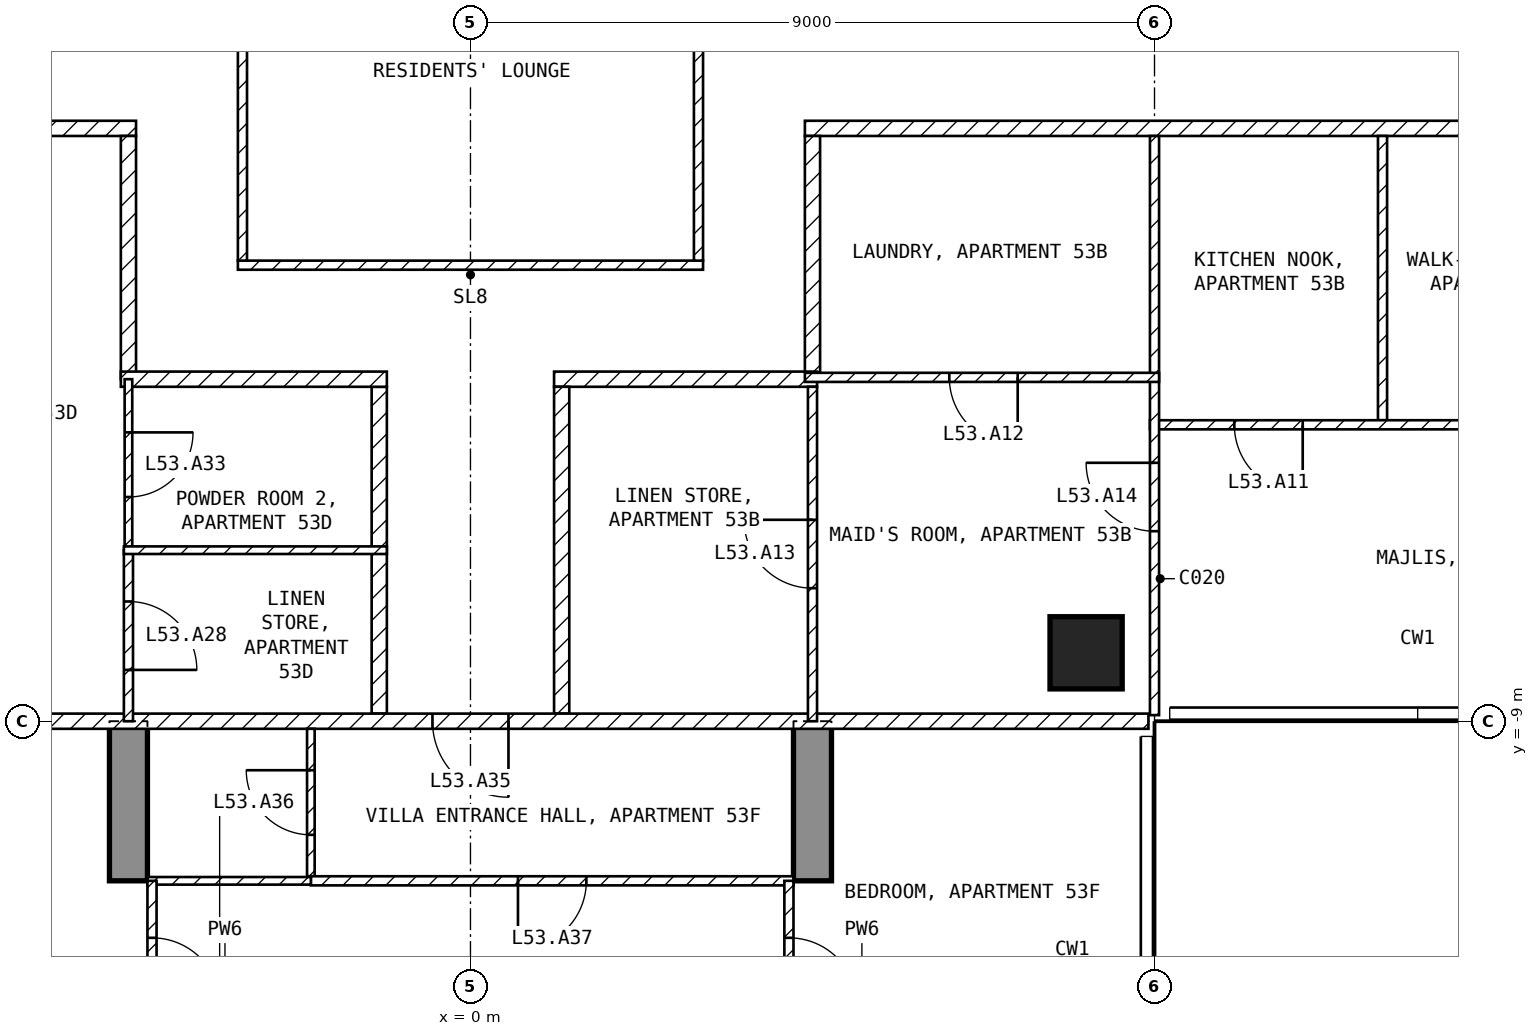
"""IFC4 building model, lengths in metres.
Left out: names, types, materials, properties, quantities, classifications, styles, units other than length and angle.
Written with IfcOpenShell. Run it as: python <this file> out.ifc"""

import sys

from ifc_helpers import new_model, si_unit, direction, frame, frame_2d, origin, origin_2d, place, context, subcontext, project, spatial, polyline, rectangle, outline, extrude, element, fill, save


model = new_model("IFC4")
c1 = context("Model", 3, precision=1e-05, world=origin(), true_north=direction((0.0, 1.0)))
c2 = subcontext(c1, "Body", "Model", "MODEL_VIEW")
j1 = project(units=[si_unit("LENGTHUNIT", "METRE"), si_unit("PLANEANGLEUNIT", "RADIAN")], contexts=[c1])
p1 = place(None, origin())
s1 = spatial("IfcSite", under=j1, at=p1, CompositionType="ELEMENT")
p2 = place(p1, origin())
s2 = spatial("IfcBuilding", under=s1, at=p2, CompositionType="ELEMENT")
p3 = place(p2, frame((0.0, 0.0, 212.1)))
s3 = spatial("IfcBuildingStorey", under=s2, at=p3, CompositionType="ELEMENT", Elevation=212.1)
p4 = place(p3, frame((8.1, -8.1, -0.25), z_axis=(0.0, 0.0, 1.0), x_axis=(1.0, 0.0, 0.0)))
e1 = element("IfcColumn", 1, at=p4, inside=s3, PredefinedType="COLUMN", context=c2, shape_type="SweptSolid", body=[
    extrude(rectangle(XDim=0.95, YDim=0.95, at=origin_2d()), origin(), (0.0, 0.0, 1.0), 3.5),
])
for number, where, z_axis, x_axis in (
    (2, (-4.75, -20.225, -0.25), (1.0, 0.0, 0.0), (0.0, 1.0, 0.0)),
    (3, (4.25, -20.225, -0.25), (1.0, 0.0, 0.0), (0.0, 1.0, 0.0)),
):
    element("IfcWall", number, at=place(p3, frame(where, z_axis=z_axis, x_axis=x_axis)), inside=s3, PredefinedType="SHEAR", context=c2, shape_type="SweptSolid", body=[
        extrude(outline(polyline([(0.0, 0.0), (6.725, 0.0), (6.725, 2.65), (9.125, 2.65), (9.125, 0.0), (11.225, 0.0), (11.225, 3.5), (0.0, 3.5), (0.0, 0.0)])), origin(), (0.0, 0.0, 1.0), 0.5),
    ])
p5 = place(p3, frame((-3.06, -3.0, 0.0), z_axis=(0.0, 0.0, 1.0), x_axis=(1.0, 0.0, 0.0)))
e4 = element("IfcWall", 4, at=p5, inside=s3, PredefinedType="PARTITIONING", context=c2, shape_type="SweptSolid", body=[
    extrude(rectangle(XDim=6.12, YDim=0.12, at=frame_2d((3.06, 0.0))), origin(), (0.0, 0.0, 1.0), 3.25),
])
for number, where, z_axis, x_axis in (
    (5, (3.0, -2.94, 0.0), (0.0, 0.0, 1.0), (0.0, 1.0, 0.0)),
    (6, (-3.0, 2.94, 0.0), (0.0, 0.0, 1.0), (0.0, -1.0, 0.0)),
):
    element("IfcWall", number, at=place(p3, frame(where, z_axis=z_axis, x_axis=x_axis)), inside=s3, PredefinedType="PARTITIONING", context=c2, shape_type="SweptSolid", body=[
        extrude(rectangle(XDim=5.88, YDim=0.12, at=frame_2d((2.94, 0.0))), origin(), (0.0, 0.0, 1.0), 3.25),
    ])
p6 = place(p3, frame((21.6, -1.2, 0.0), z_axis=(0.0, 0.0, 1.0), x_axis=(-1.0, 0.0, 0.0)))
e7 = element("IfcWall", 7, at=p6, inside=s3, PredefinedType="PARTITIONING", context=c2, shape_type="SweptSolid", body=[
    extrude(rectangle(XDim=17.2, YDim=0.2, at=frame_2d((8.6, 0.0))), origin(), (0.0, 0.0, 1.0), 3.25),
])
p7 = place(p6, frame((4.675, 0.0, 0.0)))
e8 = element("IfcOpeningElement", 8, at=p7, cuts=e7, PredefinedType="OPENING", context=c2, shape_type="SweptSolid", body=[
    extrude(rectangle(XDim=1.0, YDim=2.1, at=frame_2d((0.5, 1.05))), frame((0.0, 0.11, 0.0), z_axis=(0.0, -1.0, 0.0), x_axis=(1.0, 0.0, 0.0)), (0.0, 0.0, 1.0), 0.22),
])
p8 = place(p3, frame((4.5, -1.3, 0.0), z_axis=(0.0, 0.0, 1.0), x_axis=(0.0, -1.0, 0.0)))
e9 = element("IfcWall", 9, at=p8, inside=s3, PredefinedType="PARTITIONING", context=c2, shape_type="SweptSolid", body=[
    extrude(rectangle(XDim=3.116, YDim=0.2, at=frame_2d((1.558, 0.0))), origin(), (0.0, 0.0, 1.0), 3.25),
])
p9 = place(p3, frame((4.56, -4.5, 0.0), z_axis=(0.0, 0.0, 1.0), x_axis=(-1.0, 0.0, 0.0)))
e10 = element("IfcWall", 10, at=p9, inside=s3, PredefinedType="PARTITIONING", context=c2, shape_type="SweptSolid", body=[
    extrude(rectangle(XDim=3.46, YDim=0.2, at=frame_2d((1.73, 0.0))), origin(), (0.0, 0.0, 1.0), 3.25),
])
p10 = place(p3, frame((1.2, -4.6, 0.0), z_axis=(0.0, 0.0, 1.0), x_axis=(0.0, -1.0, 0.0)))
e11 = element("IfcWall", 11, at=p10, inside=s3, PredefinedType="PARTITIONING", context=c2, shape_type="SweptSolid", body=[
    extrude(rectangle(XDim=4.3, YDim=0.2, at=frame_2d((2.15, 0.0))), origin(), (0.0, 0.0, 1.0), 3.25),
])
p11 = place(p3, frame((-4.4, -1.2, 0.0), z_axis=(0.0, 0.0, 1.0), x_axis=(-1.0, 0.0, 0.0)))
e12 = element("IfcWall", 12, at=p11, inside=s3, PredefinedType="PARTITIONING", context=c2, shape_type="SweptSolid", body=[
    extrude(rectangle(XDim=17.2, YDim=0.2, at=frame_2d((8.6, 0.0))), origin(), (0.0, 0.0, 1.0), 3.25),
])
p12 = place(p11, frame((7.7, 0.0, 0.0)))
e13 = element("IfcOpeningElement", 13, at=p12, cuts=e12, PredefinedType="OPENING", context=c2, shape_type="SweptSolid", body=[
    extrude(rectangle(XDim=1.0, YDim=2.1, at=frame_2d((0.5, 1.05))), frame((0.0, 0.11, 0.0), z_axis=(0.0, -1.0, 0.0), x_axis=(1.0, 0.0, 0.0)), (0.0, 0.0, 1.0), 0.22),
])
p13 = place(p3, frame((-4.5, -4.5, 0.0), z_axis=(0.0, 0.0, 1.0), x_axis=(0.0, 1.0, 0.0)))
e14 = element("IfcWall", 14, at=p13, inside=s3, PredefinedType="PARTITIONING", context=c2, shape_type="SweptSolid", body=[
    extrude(rectangle(XDim=3.2, YDim=0.2, at=frame_2d((1.6, 0.0))), origin(), (0.0, 0.0, 1.0), 3.25),
])
p14 = place(p3, frame((-1.2, -8.9, 0.0), z_axis=(0.0, 0.0, 1.0), x_axis=(0.0, 1.0, 0.0)))
e15 = element("IfcWall", 15, at=p14, inside=s3, PredefinedType="PARTITIONING", context=c2, shape_type="SweptSolid", body=[
    extrude(rectangle(XDim=4.3, YDim=0.2, at=frame_2d((2.15, 0.0))), origin(), (0.0, 0.0, 1.0), 3.25),
])
p15 = place(p3, frame((-1.1, -4.5, 0.0), z_axis=(0.0, 0.0, 1.0), x_axis=(-1.0, 0.0, 0.0)))
e16 = element("IfcWall", 16, at=p15, inside=s3, PredefinedType="PARTITIONING", context=c2, shape_type="SweptSolid", body=[
    extrude(rectangle(XDim=3.5, YDim=0.2, at=frame_2d((1.75, 0.0))), origin(), (0.0, 0.0, 1.0), 3.25),
])
p16 = place(p3, frame((8.92, -9.0, 0.0), z_axis=(0.0, 0.0, 1.0), x_axis=(-1.0, 0.0, 0.0)))
e17 = element("IfcWall", 17, at=p16, inside=s3, PredefinedType="PARTITIONING", context=c2, shape_type="SweptSolid", body=[
    extrude(rectangle(XDim=17.84, YDim=0.2, at=frame_2d((8.92, 0.0))), origin(), (0.0, 0.0, 1.0), 3.25),
])
p17 = place(p16, frame((8.42, 0.0, 0.0)))
e18 = element("IfcOpeningElement", 18, at=p17, cuts=e17, PredefinedType="OPENING", context=c2, shape_type="SweptSolid", body=[
    extrude(rectangle(XDim=1.0, YDim=2.1, at=frame_2d((0.5, 1.05))), frame((0.0, 0.11, 0.0), z_axis=(0.0, -1.0, 0.0), x_axis=(1.0, 0.0, 0.0)), (0.0, 0.0, 1.0), 0.22),
])
p18 = place(p3, frame((12.0, -1.3, 0.0), z_axis=(0.0, 0.0, 1.0), x_axis=(0.0, -1.0, 0.0)))
e19 = element("IfcWall", 19, at=p18, inside=s3, PredefinedType="PARTITIONING", context=c2, shape_type="SweptSolid", body=[
    extrude(rectangle(XDim=3.74, YDim=0.12, at=frame_2d((1.87, 0.0))), origin(), (0.0, 0.0, 1.0), 3.25),
])
p19 = place(p3, frame((19.5, -5.1, 0.0), z_axis=(0.0, 0.0, 1.0), x_axis=(-1.0, 0.0, 0.0)))
e20 = element("IfcWall", 20, at=p19, inside=s3, PredefinedType="PARTITIONING", context=c2, shape_type="SweptSolid", body=[
    extrude(rectangle(XDim=10.56, YDim=0.12, at=frame_2d((5.28, 0.0))), origin(), (0.0, 0.0, 1.0), 3.25),
])
p20 = place(p19, frame((8.55, 0.0, 0.0)))
e21 = element("IfcOpeningElement", 21, at=p20, cuts=e20, PredefinedType="OPENING", context=c2, shape_type="SweptSolid", body=[
    extrude(rectangle(XDim=0.9, YDim=2.1, at=frame_2d((0.45, 1.05))), frame((0.0, 0.07, 0.0), z_axis=(0.0, -1.0, 0.0), x_axis=(1.0, 0.0, 0.0)), (0.0, 0.0, 1.0), 0.14),
])
p21 = place(p19, frame((2.625, 0.0, 0.0)))
e22 = element("IfcOpeningElement", 22, at=p21, cuts=e20, PredefinedType="OPENING", context=c2, shape_type="SweptSolid", body=[
    extrude(rectangle(XDim=0.9, YDim=2.1, at=frame_2d((0.45, 1.05))), frame((0.0, 0.07, 0.0), z_axis=(0.0, -1.0, 0.0), x_axis=(1.0, 0.0, 0.0)), (0.0, 0.0, 1.0), 0.14),
])
p22 = place(p3, frame((9.0, -8.92, 0.0), z_axis=(0.0, 0.0, 1.0), x_axis=(0.0, 1.0, 0.0)))
e23 = element("IfcWall", 23, at=p22, inside=s3, PredefinedType="PARTITIONING", context=c2, shape_type="SweptSolid", body=[
    extrude(rectangle(XDim=7.62, YDim=0.12, at=frame_2d((3.81, 0.0))), origin(), (0.0, 0.0, 1.0), 3.25),
])
p23 = place(p22, frame((2.42, 0.0, 0.0)))
e24 = element("IfcOpeningElement", 24, at=p23, cuts=e23, PredefinedType="OPENING", context=c2, shape_type="SweptSolid", body=[
    extrude(rectangle(XDim=0.9, YDim=2.1, at=frame_2d((0.45, 1.05))), frame((0.0, 0.07, 0.0), z_axis=(0.0, -1.0, 0.0), x_axis=(1.0, 0.0, 0.0)), (0.0, 0.0, 1.0), 0.14),
])
p24 = place(p3, frame((9.06, -4.476, 0.0), z_axis=(0.0, 0.0, 1.0), x_axis=(-1.0, 0.0, 0.0)))
e25 = element("IfcWall", 25, at=p24, inside=s3, PredefinedType="PARTITIONING", context=c2, shape_type="SweptSolid", body=[
    extrude(rectangle(XDim=4.66, YDim=0.12, at=frame_2d((2.33, 0.0))), origin(), (0.0, 0.0, 1.0), 3.25),
])
p25 = place(p24, frame((1.86, 0.0, 0.0)))
e26 = element("IfcOpeningElement", 26, at=p25, cuts=e25, PredefinedType="OPENING", context=c2, shape_type="SweptSolid", body=[
    extrude(rectangle(XDim=0.9, YDim=2.1, at=frame_2d((0.45, 1.05))), frame((0.0, 0.07, 0.0), z_axis=(0.0, -1.0, 0.0), x_axis=(1.0, 0.0, 0.0)), (0.0, 0.0, 1.0), 0.14),
])
p26 = place(p3, frame((4.5, -9.0, 0.0), z_axis=(0.0, 0.0, 1.0), x_axis=(0.0, 1.0, 0.0)))
e27 = element("IfcWall", 27, at=p26, inside=s3, PredefinedType="PARTITIONING", context=c2, shape_type="SweptSolid", body=[
    extrude(rectangle(XDim=4.4, YDim=0.12, at=frame_2d((2.2, 0.0))), origin(), (0.0, 0.0, 1.0), 3.25),
])
p27 = place(p26, frame((1.75, 0.0, 0.0)))
e28 = element("IfcOpeningElement", 28, at=p27, cuts=e27, PredefinedType="OPENING", context=c2, shape_type="SweptSolid", body=[
    extrude(rectangle(XDim=0.9, YDim=2.1, at=frame_2d((0.45, 1.05))), frame((0.0, 0.07, 0.0), z_axis=(0.0, -1.0, 0.0), x_axis=(1.0, 0.0, 0.0)), (0.0, 0.0, 1.0), 0.14),
])
p28 = place(p3, frame((-4.5, -4.5, 0.0), z_axis=(0.0, 0.0, 1.0), x_axis=(0.0, -1.0, 0.0)))
e29 = element("IfcWall", 29, at=p28, inside=s3, PredefinedType="PARTITIONING", context=c2, shape_type="SweptSolid", body=[
    extrude(rectangle(XDim=2.25, YDim=0.1, at=frame_2d((1.125, 0.0))), origin(), (0.0, 0.0, 1.0), 3.25),
])
p29 = place(p28, frame((0.7, 0.0, 0.0)))
e30 = element("IfcOpeningElement", 30, at=p29, cuts=e29, PredefinedType="OPENING", context=c2, shape_type="SweptSolid", body=[
    extrude(rectangle(XDim=0.85, YDim=2.1, at=frame_2d((0.425, 1.05))), frame((0.0, 0.06, 0.0), z_axis=(0.0, -1.0, 0.0), x_axis=(1.0, 0.0, 0.0)), (0.0, 0.0, 1.0), 0.12),
])
p30 = place(p3, frame((-4.5, -6.75, 0.0), z_axis=(0.0, 0.0, 1.0), x_axis=(0.0, -1.0, 0.0)))
e31 = element("IfcWall", 31, at=p30, inside=s3, PredefinedType="PARTITIONING", context=c2, shape_type="SweptSolid", body=[
    extrude(rectangle(XDim=2.25, YDim=0.12, at=frame_2d((1.125, 0.0))), origin(), (0.0, 0.0, 1.0), 3.25),
])
p31 = place(p30, frame((0.675, 0.0, 0.0)))
e32 = element("IfcOpeningElement", 32, at=p31, cuts=e31, PredefinedType="OPENING", context=c2, shape_type="SweptSolid", body=[
    extrude(rectangle(XDim=0.9, YDim=2.1, at=frame_2d((0.45, 1.05))), frame((0.0, 0.07, 0.0), z_axis=(0.0, -1.0, 0.0), x_axis=(1.0, 0.0, 0.0)), (0.0, 0.0, 1.0), 0.14),
])
p32 = place(p3, frame((-1.1, -6.75, 0.0), z_axis=(0.0, 0.0, 1.0), x_axis=(-1.0, 0.0, 0.0)))
e33 = element("IfcWall", 33, at=p32, inside=s3, PredefinedType="PARTITIONING", context=c2, shape_type="SweptSolid", body=[
    extrude(rectangle(XDim=3.46, YDim=0.1, at=frame_2d((1.73, 0.0))), origin(), (0.0, 0.0, 1.0), 3.25),
])
p33 = place(p3, frame((-2.1, -11.04, 0.0), z_axis=(0.0, 0.0, 1.0), x_axis=(0.0, 1.0, 0.0)))
e34 = element("IfcWall", 34, at=p33, inside=s3, PredefinedType="PARTITIONING", context=c2, shape_type="SweptSolid", body=[
    extrude(rectangle(XDim=1.94, YDim=0.1, at=frame_2d((0.97, 0.0))), origin(), (0.0, 0.0, 1.0), 3.25),
])
p34 = place(p33, frame((0.545, 0.0, 0.0)))
e35 = element("IfcOpeningElement", 35, at=p34, cuts=e34, PredefinedType="OPENING", context=c2, shape_type="SweptSolid", body=[
    extrude(rectangle(XDim=0.85, YDim=2.1, at=frame_2d((0.425, 1.05))), frame((0.0, 0.06, 0.0), z_axis=(0.0, -1.0, 0.0), x_axis=(1.0, 0.0, 0.0)), (0.0, 0.0, 1.0), 0.12),
])
p35 = place(p3, frame((4.25, -11.1, 0.0), z_axis=(0.0, 0.0, 1.0), x_axis=(-1.0, 0.0, 0.0)))
e36 = element("IfcWall", 36, at=p35, inside=s3, PredefinedType="PARTITIONING", context=c2, shape_type="SweptSolid", body=[
    extrude(rectangle(XDim=6.35, YDim=0.12, at=frame_2d((3.175, 0.0))), origin(), (0.0, 0.0, 1.0), 3.25),
])
p36 = place(p35, frame((2.725, 0.0, 0.0)))
e37 = element("IfcOpeningElement", 37, at=p36, cuts=e36, PredefinedType="OPENING", context=c2, shape_type="SweptSolid", body=[
    extrude(rectangle(XDim=0.9, YDim=2.1, at=frame_2d((0.45, 1.05))), frame((0.0, 0.07, 0.0), z_axis=(0.0, -1.0, 0.0), x_axis=(1.0, 0.0, 0.0)), (0.0, 0.0, 1.0), 0.14),
])
p37 = place(p3, frame((-2.1, -11.1, 0.0), z_axis=(0.0, 0.0, 1.0), x_axis=(-1.0, 0.0, 0.0)))
e38 = element("IfcWall", 38, at=p37, inside=s3, PredefinedType="PARTITIONING", context=c2, shape_type="SweptSolid", body=[
    extrude(rectangle(XDim=2.15, YDim=0.1, at=frame_2d((1.075, 0.0))), origin(), (0.0, 0.0, 1.0), 3.25),
])
p38 = place(p3, frame((4.19, -11.1, 0.0), z_axis=(0.0, 0.0, 1.0), x_axis=(0.0, -1.0, 0.0)))
e39 = element("IfcWall", 39, at=p38, inside=s3, PredefinedType="PARTITIONING", context=c2, shape_type="SweptSolid", body=[
    extrude(rectangle(XDim=2.4, YDim=0.12, at=frame_2d((1.2, 0.0))), origin(), (0.0, 0.0, 1.0), 2.4),
])
p39 = place(p38, frame((0.75, 0.0, 0.0)))
e40 = element("IfcOpeningElement", 40, at=p39, cuts=e39, PredefinedType="OPENING", context=c2, shape_type="SweptSolid", body=[
    extrude(rectangle(XDim=0.9, YDim=2.1, at=frame_2d((0.45, 1.05))), frame((0.0, 0.07, 0.0), z_axis=(0.0, -1.0, 0.0), x_axis=(1.0, 0.0, 0.0)), (0.0, 0.0, 1.0), 0.14),
])
p40 = place(p3, frame((-4.19, -11.1, 0.0), z_axis=(0.0, 0.0, 1.0), x_axis=(0.0, -1.0, 0.0)))
e41 = element("IfcWall", 41, at=p40, inside=s3, PredefinedType="PARTITIONING", context=c2, shape_type="SweptSolid", body=[
    extrude(rectangle(XDim=2.4, YDim=0.12, at=frame_2d((1.2, 0.0))), origin(), (0.0, 0.0, 1.0), 2.4),
])
p41 = place(p40, frame((0.75, 0.0, 0.0)))
e42 = element("IfcOpeningElement", 42, at=p41, cuts=e41, PredefinedType="OPENING", context=c2, shape_type="SweptSolid", body=[
    extrude(rectangle(XDim=0.9, YDim=2.1, at=frame_2d((0.45, 1.05))), frame((0.0, 0.07, 0.0), z_axis=(0.0, -1.0, 0.0), x_axis=(1.0, 0.0, 0.0)), (0.0, 0.0, 1.0), 0.14),
])
p42 = place(p20, origin())
e43 = element("IfcDoor", 43, at=p42, inside=s3, OperationType="SINGLE_SWING_LEFT", PredefinedType="DOOR", context=c2, shape_type="SweptSolid", body=[
    extrude(rectangle(XDim=0.9, YDim=2.1, at=frame_2d((0.45, 1.05))), frame((0.0, 0.025, 0.0), z_axis=(0.0, -1.0, 0.0), x_axis=(1.0, 0.0, 0.0)), (0.0, 0.0, 1.0), 0.05),
])
fill(e21, e43)
p43 = place(p25, origin())
e44 = element("IfcDoor", 44, at=p43, inside=s3, OperationType="SINGLE_SWING_LEFT", PredefinedType="DOOR", context=c2, shape_type="SweptSolid", body=[
    extrude(rectangle(XDim=0.9, YDim=2.1, at=frame_2d((0.45, 1.05))), frame((0.0, 0.025, 0.0), z_axis=(0.0, -1.0, 0.0), x_axis=(1.0, 0.0, 0.0)), (0.0, 0.0, 1.0), 0.05),
])
fill(e26, e44)
p44 = place(p27, origin())
e45 = element("IfcDoor", 45, at=p44, inside=s3, OperationType="SINGLE_SWING_RIGHT", PredefinedType="DOOR", context=c2, shape_type="SweptSolid", body=[
    extrude(rectangle(XDim=0.9, YDim=2.1, at=frame_2d((0.45, 1.05))), frame((0.0, 0.025, 0.0), z_axis=(0.0, -1.0, 0.0), x_axis=(1.0, 0.0, 0.0)), (0.0, 0.0, 1.0), 0.05),
])
fill(e28, e45)
p45 = place(p23, origin())
e46 = element("IfcDoor", 46, at=p45, inside=s3, OperationType="SINGLE_SWING_RIGHT", PredefinedType="DOOR", context=c2, shape_type="SweptSolid", body=[
    extrude(rectangle(XDim=0.9, YDim=2.1, at=frame_2d((0.45, 1.05))), frame((0.0, 0.025, 0.0), z_axis=(0.0, -1.0, 0.0), x_axis=(1.0, 0.0, 0.0)), (0.0, 0.0, 1.0), 0.05),
])
fill(e24, e46)
p46 = place(p31, origin())
e47 = element("IfcDoor", 47, at=p46, inside=s3, OperationType="SINGLE_SWING_RIGHT", PredefinedType="DOOR", context=c2, shape_type="SweptSolid", body=[
    extrude(rectangle(XDim=0.9, YDim=2.1, at=frame_2d((0.45, 1.05))), frame((0.0, 0.025, 0.0), z_axis=(0.0, -1.0, 0.0), x_axis=(1.0, 0.0, 0.0)), (0.0, 0.0, 1.0), 0.05),
])
fill(e32, e47)
p47 = place(p29, origin())
e48 = element("IfcDoor", 48, at=p47, inside=s3, OperationType="SINGLE_SWING_LEFT", PredefinedType="DOOR", context=c2, shape_type="SweptSolid", body=[
    extrude(rectangle(XDim=0.85, YDim=2.1, at=frame_2d((0.425, 1.05))), frame((0.0, 0.025, 0.0), z_axis=(0.0, -1.0, 0.0), x_axis=(1.0, 0.0, 0.0)), (0.0, 0.0, 1.0), 0.05),
])
fill(e30, e48)
p48 = place(p17, origin())
e49 = element("IfcDoor", 49, at=p48, inside=s3, OperationType="SINGLE_SWING_LEFT", PredefinedType="DOOR", context=c2, shape_type="SweptSolid", body=[
    extrude(rectangle(XDim=1.0, YDim=2.1, at=frame_2d((0.5, 1.05))), frame((0.0, 0.025, 0.0), z_axis=(0.0, -1.0, 0.0), x_axis=(1.0, 0.0, 0.0)), (0.0, 0.0, 1.0), 0.05),
])
fill(e18, e49)
p49 = place(p34, origin())
e50 = element("IfcDoor", 50, at=p49, inside=s3, OperationType="SINGLE_SWING_RIGHT", PredefinedType="DOOR", context=c2, shape_type="SweptSolid", body=[
    extrude(rectangle(XDim=0.85, YDim=2.1, at=frame_2d((0.425, 1.05))), frame((0.0, 0.025, 0.0), z_axis=(0.0, -1.0, 0.0), x_axis=(1.0, 0.0, 0.0)), (0.0, 0.0, 1.0), 0.05),
])
fill(e35, e50)
p50 = place(p36, origin())
e51 = element("IfcDoor", 51, at=p50, inside=s3, OperationType="SINGLE_SWING_RIGHT", PredefinedType="DOOR", context=c2, shape_type="SweptSolid", body=[
    extrude(rectangle(XDim=0.9, YDim=2.1, at=frame_2d((0.45, 1.05))), frame((0.0, 0.025, 0.0), z_axis=(0.0, -1.0, 0.0), x_axis=(1.0, 0.0, 0.0)), (0.0, 0.0, 1.0), 0.05),
])
fill(e37, e51)
p51 = place(p39, origin())
e52 = element("IfcDoor", 52, at=p51, inside=s3, OperationType="SINGLE_SWING_RIGHT", PredefinedType="DOOR", context=c2, shape_type="SweptSolid", body=[
    extrude(rectangle(XDim=0.9, YDim=2.1, at=frame_2d((0.45, 1.05))), frame((0.0, 0.025, 0.0), z_axis=(0.0, -1.0, 0.0), x_axis=(1.0, 0.0, 0.0)), (0.0, 0.0, 1.0), 0.05),
])
fill(e40, e52)
p52 = place(p41, origin())
e53 = element("IfcDoor", 53, at=p52, inside=s3, OperationType="SINGLE_SWING_RIGHT", PredefinedType="DOOR", context=c2, shape_type="SweptSolid", body=[
    extrude(rectangle(XDim=0.9, YDim=2.1, at=frame_2d((0.45, 1.05))), frame((0.0, 0.025, 0.0), z_axis=(0.0, -1.0, 0.0), x_axis=(1.0, 0.0, 0.0)), (0.0, 0.0, 1.0), 0.05),
])
fill(e42, e53)
save(model, sys.argv[1])
